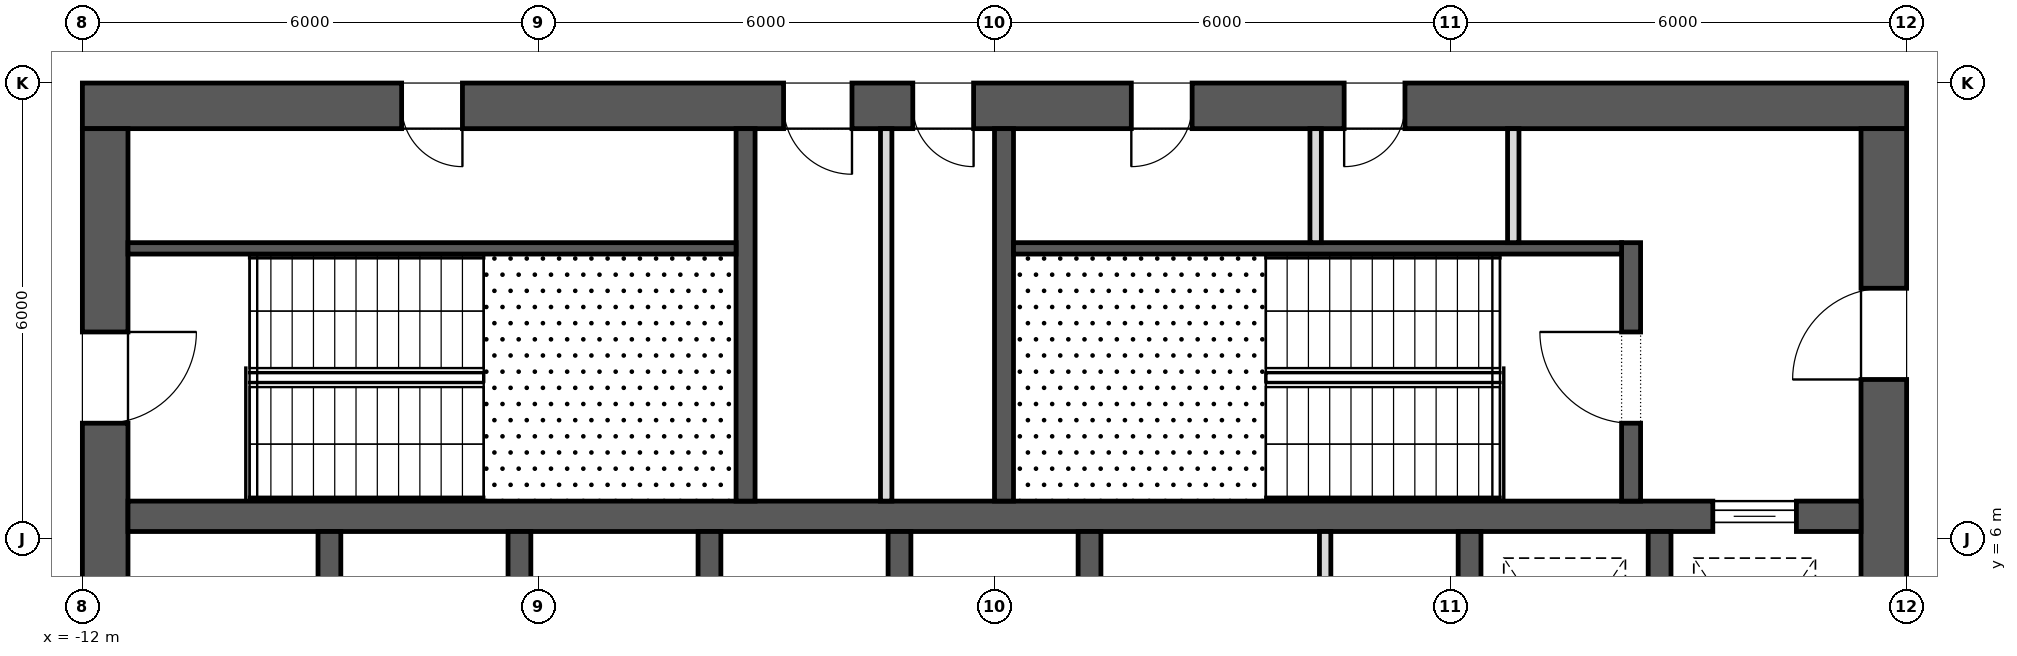
"""IFC4 building model, lengths in metres.
Left out: names, types, materials, properties, quantities, classifications, styles, units other than length and angle.
Written with IfcOpenShell. Run it as: python <this file> out.ifc"""

import sys

from ifc_helpers import new_model, si_unit, direction, frame, frame_2d, origin, place, context, subcontext, project, spatial, rectangle, extrude, element, fill, save


model = new_model("IFC4")
c1 = context("Model", 3, precision=1e-05, world=origin(), true_north=direction((0.0, 1.0)))
c2 = subcontext(c1, "Body", "Model", "MODEL_VIEW")
j1 = project(units=[si_unit("LENGTHUNIT", "METRE"), si_unit("PLANEANGLEUNIT", "RADIAN")], contexts=[c1])
p1 = place(None, origin())
s1 = spatial("IfcSite", under=j1, at=p1, CompositionType="ELEMENT")
p2 = place(p1, origin())
s2 = spatial("IfcBuilding", under=s1, at=p2, CompositionType="ELEMENT")
p3 = place(p2, frame((0.0, 0.0, 210.9)))
s3 = spatial("IfcBuildingStorey", under=s2, at=p3, CompositionType="ELEMENT", Elevation=210.9)
p4 = place(p3, frame((-12.0, 11.7, 0.0), z_axis=(0.0, 0.0, 1.0), x_axis=(1.0, 0.0, 0.0)))
e1 = element("IfcWall", 1, at=p4, inside=s3, PredefinedType="SHEAR", context=c2, shape_type="SweptSolid", body=[
    extrude(rectangle(XDim=24.0, YDim=0.6, at=frame_2d((12.0, 0.0))), origin(), (0.0, 0.0, 1.0), 4.0),
])
p5 = place(p4, frame((9.225, 0.0, 0.0)))
e2 = element("IfcOpeningElement", 2, at=p5, cuts=e1, PredefinedType="OPENING", context=c2, shape_type="SweptSolid", body=[
    extrude(rectangle(XDim=0.9, YDim=2.1, at=frame_2d((0.45, 1.05))), frame((0.0, 0.312, 0.0), z_axis=(0.0, -1.0, 0.0), x_axis=(1.0, 0.0, 0.0)), (0.0, 0.0, 1.0), 0.624),
])
p6 = place(p4, frame((10.925, 0.0, 0.0)))
e3 = element("IfcOpeningElement", 3, at=p6, cuts=e1, PredefinedType="OPENING", context=c2, shape_type="SweptSolid", body=[
    extrude(rectangle(XDim=0.8, YDim=2.1, at=frame_2d((0.4, 1.05))), frame((0.0, 0.312, 0.0), z_axis=(0.0, -1.0, 0.0), x_axis=(1.0, 0.0, 0.0)), (0.0, 0.0, 1.0), 0.624),
])
p7 = place(p4, frame((4.2, 0.0, 0.0)))
e4 = element("IfcOpeningElement", 4, at=p7, cuts=e1, PredefinedType="OPENING", context=c2, shape_type="SweptSolid", body=[
    extrude(rectangle(XDim=0.8, YDim=2.1, at=frame_2d((0.4, 1.05))), frame((0.0, 0.312, 0.0), z_axis=(0.0, -1.0, 0.0), x_axis=(1.0, 0.0, 0.0)), (0.0, 0.0, 1.0), 0.624),
])
p8 = place(p4, frame((13.8, 0.0, 0.0)))
e5 = element("IfcOpeningElement", 5, at=p8, cuts=e1, PredefinedType="OPENING", context=c2, shape_type="SweptSolid", body=[
    extrude(rectangle(XDim=0.8, YDim=2.1, at=frame_2d((0.4, 1.05))), frame((0.0, 0.312, 0.0), z_axis=(0.0, -1.0, 0.0), x_axis=(1.0, 0.0, 0.0)), (0.0, 0.0, 1.0), 0.624),
])
p9 = place(p4, frame((16.6, 0.0, 0.0)))
e6 = element("IfcOpeningElement", 6, at=p9, cuts=e1, PredefinedType="OPENING", context=c2, shape_type="SweptSolid", body=[
    extrude(rectangle(XDim=0.8, YDim=2.1, at=frame_2d((0.4, 1.05))), frame((0.0, 0.312, 0.0), z_axis=(0.0, -1.0, 0.0), x_axis=(1.0, 0.0, 0.0)), (0.0, 0.0, 1.0), 0.624),
])
p10 = place(p3, frame((11.7, -11.4, 0.0), z_axis=(0.0, 0.0, 1.0), x_axis=(0.0, 1.0, 0.0)))
e7 = element("IfcWall", 7, at=p10, inside=s3, PredefinedType="SHEAR", context=c2, shape_type="SweptSolid", body=[
    extrude(rectangle(XDim=22.8, YDim=0.6, at=frame_2d((11.4, 0.0))), origin(), (0.0, 0.0, 1.0), 4.0),
])
p11 = place(p10, frame((10.2, 0.0, 0.0)))
e8 = element("IfcOpeningElement", 8, at=p11, cuts=e7, PredefinedType="OPENING", context=c2, shape_type="SweptSolid", body=[
    extrude(rectangle(XDim=2.4, YDim=2.1, at=frame_2d((1.2, 1.05))), frame((0.0, 0.312, 0.0), z_axis=(0.0, -1.0, 0.0), x_axis=(1.0, 0.0, 0.0)), (0.0, 0.0, 1.0), 0.624),
])
p12 = place(p10, frame((19.5, 0.0, 0.0)))
e9 = element("IfcOpeningElement", 9, at=p12, cuts=e7, PredefinedType="OPENING", context=c2, shape_type="SweptSolid", body=[
    extrude(rectangle(XDim=1.2, YDim=2.1, at=frame_2d((0.6, 1.05))), frame((0.0, 0.312, 0.0), z_axis=(0.0, -1.0, 0.0), x_axis=(1.0, 0.0, 0.0)), (0.0, 0.0, 1.0), 0.624),
])
p13 = place(p10, frame((2.1, 0.0, 0.0)))
e10 = element("IfcOpeningElement", 10, at=p13, cuts=e7, PredefinedType="OPENING", context=c2, shape_type="SweptSolid", body=[
    extrude(rectangle(XDim=1.2, YDim=2.1, at=frame_2d((0.6, 1.05))), frame((0.0, 0.312, 0.0), z_axis=(0.0, -1.0, 0.0), x_axis=(1.0, 0.0, 0.0)), (0.0, 0.0, 1.0), 0.624),
])
p14 = place(p3, frame((-11.7, -11.4, 0.0), z_axis=(0.0, 0.0, 1.0), x_axis=(0.0, 1.0, 0.0)))
e11 = element("IfcWall", 11, at=p14, inside=s3, PredefinedType="SHEAR", context=c2, shape_type="SweptSolid", body=[
    extrude(rectangle(XDim=22.8, YDim=0.6, at=frame_2d((11.4, 0.0))), origin(), (0.0, 0.0, 1.0), 4.0),
])
p15 = place(p14, frame((10.2, 0.0, 0.0)))
e12 = element("IfcOpeningElement", 12, at=p15, cuts=e11, PredefinedType="OPENING", context=c2, shape_type="SweptSolid", body=[
    extrude(rectangle(XDim=2.4, YDim=2.1, at=frame_2d((1.2, 1.05))), frame((0.0, 0.312, 0.0), z_axis=(0.0, -1.0, 0.0), x_axis=(1.0, 0.0, 0.0)), (0.0, 0.0, 1.0), 0.624),
])
p16 = place(p14, frame((18.925, 0.0, 0.0)))
e13 = element("IfcOpeningElement", 13, at=p16, cuts=e11, PredefinedType="OPENING", context=c2, shape_type="SweptSolid", body=[
    extrude(rectangle(XDim=1.2, YDim=2.1, at=frame_2d((0.6, 1.05))), frame((0.0, 0.312, 0.0), z_axis=(0.0, -1.0, 0.0), x_axis=(1.0, 0.0, 0.0)), (0.0, 0.0, 1.0), 0.624),
])
p17 = place(p14, frame((2.675, 0.0, 0.0)))
e14 = element("IfcOpeningElement", 14, at=p17, cuts=e11, PredefinedType="OPENING", context=c2, shape_type="SweptSolid", body=[
    extrude(rectangle(XDim=1.2, YDim=2.1, at=frame_2d((0.6, 1.05))), frame((0.0, 0.312, 0.0), z_axis=(0.0, -1.0, 0.0), x_axis=(1.0, 0.0, 0.0)), (0.0, 0.0, 1.0), 0.624),
])
p18 = place(p3, frame((-11.4, 6.3, 0.0), z_axis=(0.0, 0.0, 1.0), x_axis=(1.0, 0.0, 0.0)))
e15 = element("IfcWall", 15, at=p18, inside=s3, PredefinedType="SHEAR", context=c2, shape_type="SweptSolid", body=[
    extrude(rectangle(XDim=22.8, YDim=0.4, at=frame_2d((11.4, 0.0))), origin(), (0.0, 0.0, 1.0), 4.0),
])
p19 = place(p18, frame((20.85, 0.0, 0.0)))
e16 = element("IfcOpeningElement", 16, at=p19, cuts=e15, PredefinedType="OPENING", context=c2, shape_type="SweptSolid", body=[
    extrude(rectangle(XDim=1.1, YDim=2.1, at=frame_2d((0.55, 1.05))), frame((0.0, 0.212, 0.0), z_axis=(0.0, -1.0, 0.0), x_axis=(1.0, 0.0, 0.0)), (0.0, 0.0, 1.0), 0.424),
])
for number, where, z_axis, x_axis in (
    (17, (-8.75, 3.2, 0.0), (0.0, 0.0, 1.0), (0.0, 1.0, 0.0)),
    (18, (-6.25, 3.2, 0.0), (0.0, 0.0, 1.0), (0.0, 1.0, 0.0)),
    (19, (-3.75, 3.2, 0.0), (0.0, 0.0, 1.0), (0.0, 1.0, 0.0)),
    (20, (-1.25, 3.2, 0.0), (0.0, 0.0, 1.0), (0.0, 1.0, 0.0)),
    (21, (1.25, 3.2, 0.0), (0.0, 0.0, 1.0), (0.0, 1.0, 0.0)),
    (22, (6.25, 3.2, 0.0), (0.0, 0.0, 1.0), (0.0, 1.0, 0.0)),
    (23, (8.75, 3.2, 0.0), (0.0, 0.0, 1.0), (0.0, 1.0, 0.0)),
):
    element("IfcWall", number, at=place(p3, frame(where, z_axis=z_axis, x_axis=x_axis)), inside=s3, PredefinedType="SHEAR", context=c2, shape_type="SweptSolid", body=[
        extrude(rectangle(XDim=2.9, YDim=0.3, at=frame_2d((1.45, 0.0))), origin(), (0.0, 0.0, 1.0), 4.0),
    ])
for number, where, z_axis, x_axis in (
    (24, (-3.275, 6.5, 0.0), (0.0, 0.0, 1.0), (0.0, 1.0, 0.0)),
    (25, (0.125, 6.5, 0.0), (0.0, 0.0, 1.0), (0.0, 1.0, 0.0)),
):
    element("IfcWall", number, at=place(p3, frame(where, z_axis=z_axis, x_axis=x_axis)), inside=s3, PredefinedType="SHEAR", context=c2, shape_type="SweptSolid", body=[
        extrude(rectangle(XDim=4.9, YDim=0.25, at=frame_2d((2.45, 0.0))), origin(), (0.0, 0.0, 1.0), 3.7),
    ])
p20 = place(p3, frame((8.375, 6.5, 0.0), z_axis=(0.0, 0.0, 1.0), x_axis=(0.0, 1.0, 0.0)))
e26 = element("IfcWall", 26, at=p20, inside=s3, PredefinedType="SHEAR", context=c2, shape_type="SweptSolid", body=[
    extrude(rectangle(XDim=3.4, YDim=0.25, at=frame_2d((1.7, 0.0))), origin(), (0.0, 0.0, 1.0), 3.7),
])
p21 = place(p20, frame((1.025, 0.0, 0.0)))
e27 = element("IfcOpeningElement", 27, at=p21, cuts=e26, PredefinedType="OPENING", context=c2, shape_type="SweptSolid", body=[
    extrude(rectangle(XDim=1.2, YDim=2.1, at=frame_2d((0.6, 1.05))), frame((0.0, 0.137, 0.0), z_axis=(0.0, -1.0, 0.0), x_axis=(1.0, 0.0, 0.0)), (0.0, 0.0, 1.0), 0.274),
])
for number, where, z_axis, x_axis in (
    (28, (-11.4, 9.825, 0.0), (0.0, 0.0, 1.0), (1.0, 0.0, 0.0)),
    (29, (0.25, 9.825, 0.0), (0.0, 0.0, 1.0), (1.0, 0.0, 0.0)),
):
    element("IfcWall", number, at=place(p3, frame(where, z_axis=z_axis, x_axis=x_axis)), inside=s3, PredefinedType="SHEAR", context=c2, shape_type="SweptSolid", body=[
        extrude(rectangle(XDim=8.0, YDim=0.15, at=frame_2d((4.0, 0.0))), origin(), (0.0, 0.0, 1.0), 3.7),
    ])
p22 = place(p3, frame((-1.425, 6.5, 0.0), z_axis=(0.0, 0.0, 1.0), x_axis=(0.0, 1.0, 0.0)))
e30 = element("IfcWall", 30, at=p22, inside=s3, PredefinedType="PARTITIONING", context=c2, shape_type="SweptSolid", body=[
    extrude(rectangle(XDim=4.9, YDim=0.15, at=frame_2d((2.45, 0.0))), origin(), (0.0, 0.0, 1.0), 3.7),
])
for number, where, z_axis, x_axis in (
    (31, (4.225, 9.9, 0.0), (0.0, 0.0, 1.0), (0.0, 1.0, 0.0)),
    (32, (6.825, 9.9, 0.0), (0.0, 0.0, 1.0), (0.0, 1.0, 0.0)),
):
    element("IfcWall", number, at=place(p3, frame(where, z_axis=z_axis, x_axis=x_axis)), inside=s3, PredefinedType="PARTITIONING", context=c2, shape_type="SweptSolid", body=[
        extrude(rectangle(XDim=1.5, YDim=0.15, at=frame_2d((0.75, 0.0))), origin(), (0.0, 0.0, 1.0), 3.7),
    ])
p23 = place(p3, frame((4.35, 3.2, 0.0), z_axis=(0.0, 0.0, 1.0), x_axis=(0.0, 1.0, 0.0)))
e33 = element("IfcWall", 33, at=p23, inside=s3, PredefinedType="PARTITIONING", context=c2, shape_type="SweptSolid", body=[
    extrude(rectangle(XDim=2.9, YDim=0.15, at=frame_2d((1.45, 0.0))), origin(), (0.0, 0.0, 1.0), 3.7),
])
p24 = place(p19, origin())
e34 = element("IfcDoor", 34, at=p24, inside=s3, OperationType="SLIDING_TO_LEFT", PredefinedType="DOOR", context=c2, shape_type="SweptSolid", body=[
    extrude(rectangle(XDim=1.1, YDim=2.1, at=frame_2d((0.55, 1.05))), frame((0.0, 0.025, 0.0), z_axis=(0.0, -1.0, 0.0), x_axis=(1.0, 0.0, 0.0)), (0.0, 0.0, 1.0), 0.05),
])
fill(e16, e34)
p25 = place(p16, frame((1.2, 0.0, 0.0), z_axis=(0.0, 0.0, 1.0), x_axis=(-1.0, 0.0, 0.0)))
e35 = element("IfcDoor", 35, at=p25, inside=s3, OperationType="SINGLE_SWING_RIGHT", PredefinedType="DOOR", context=c2, shape_type="SweptSolid", body=[
    extrude(rectangle(XDim=1.2, YDim=2.1, at=frame_2d((0.6, 1.05))), frame((0.0, 0.025, 0.0), z_axis=(0.0, -1.0, 0.0), x_axis=(1.0, 0.0, 0.0)), (0.0, 0.0, 1.0), 0.05),
])
fill(e13, e35)
p26 = place(p21, origin())
e36 = element("IfcDoor", 36, at=p26, inside=s3, OperationType="SINGLE_SWING_LEFT", PredefinedType="DOOR", context=c2, shape_type="SweptSolid", body=[
    extrude(rectangle(XDim=1.2, YDim=2.1, at=frame_2d((0.6, 1.05))), frame((0.0, 0.025, 0.0), z_axis=(0.0, -1.0, 0.0), x_axis=(1.0, 0.0, 0.0)), (0.0, 0.0, 1.0), 0.05),
])
fill(e27, e36)
p27 = place(p12, origin())
e37 = element("IfcDoor", 37, at=p27, inside=s3, OperationType="SINGLE_SWING_RIGHT", PredefinedType="DOOR", context=c2, shape_type="SweptSolid", body=[
    extrude(rectangle(XDim=1.2, YDim=2.1, at=frame_2d((0.6, 1.05))), frame((0.0, 0.025, 0.0), z_axis=(0.0, -1.0, 0.0), x_axis=(1.0, 0.0, 0.0)), (0.0, 0.0, 1.0), 0.05),
])
fill(e9, e37)
p28 = place(p5, frame((0.9, 0.0, 0.0), z_axis=(0.0, 0.0, 1.0), x_axis=(-1.0, 0.0, 0.0)))
e38 = element("IfcDoor", 38, at=p28, inside=s3, OperationType="SINGLE_SWING_RIGHT", PredefinedType="DOOR", context=c2, shape_type="SweptSolid", body=[
    extrude(rectangle(XDim=0.9, YDim=2.1, at=frame_2d((0.45, 1.05))), frame((0.0, 0.025, 0.0), z_axis=(0.0, -1.0, 0.0), x_axis=(1.0, 0.0, 0.0)), (0.0, 0.0, 1.0), 0.05),
])
fill(e2, e38)
p29 = place(p6, frame((0.8, 0.0, 0.0), z_axis=(0.0, 0.0, 1.0), x_axis=(-1.0, 0.0, 0.0)))
e39 = element("IfcDoor", 39, at=p29, inside=s3, OperationType="SINGLE_SWING_RIGHT", PredefinedType="DOOR", context=c2, shape_type="SweptSolid", body=[
    extrude(rectangle(XDim=0.8, YDim=2.1, at=frame_2d((0.4, 1.05))), frame((0.0, 0.025, 0.0), z_axis=(0.0, -1.0, 0.0), x_axis=(1.0, 0.0, 0.0)), (0.0, 0.0, 1.0), 0.05),
])
fill(e3, e39)
p30 = place(p7, frame((0.8, 0.0, 0.0), z_axis=(0.0, 0.0, 1.0), x_axis=(-1.0, 0.0, 0.0)))
e40 = element("IfcDoor", 40, at=p30, inside=s3, OperationType="SINGLE_SWING_RIGHT", PredefinedType="DOOR", context=c2, shape_type="SweptSolid", body=[
    extrude(rectangle(XDim=0.8, YDim=2.1, at=frame_2d((0.4, 1.05))), frame((0.0, 0.025, 0.0), z_axis=(0.0, -1.0, 0.0), x_axis=(1.0, 0.0, 0.0)), (0.0, 0.0, 1.0), 0.05),
])
fill(e4, e40)
p31 = place(p8, frame((0.8, 0.0, 0.0), z_axis=(0.0, 0.0, 1.0), x_axis=(-1.0, 0.0, 0.0)))
e41 = element("IfcDoor", 41, at=p31, inside=s3, OperationType="SINGLE_SWING_LEFT", PredefinedType="DOOR", context=c2, shape_type="SweptSolid", body=[
    extrude(rectangle(XDim=0.8, YDim=2.1, at=frame_2d((0.4, 1.05))), frame((0.0, 0.025, 0.0), z_axis=(0.0, -1.0, 0.0), x_axis=(1.0, 0.0, 0.0)), (0.0, 0.0, 1.0), 0.05),
])
fill(e5, e41)
p32 = place(p9, frame((0.8, 0.0, 0.0), z_axis=(0.0, 0.0, 1.0), x_axis=(-1.0, 0.0, 0.0)))
e42 = element("IfcDoor", 42, at=p32, inside=s3, OperationType="SINGLE_SWING_LEFT", PredefinedType="DOOR", context=c2, shape_type="SweptSolid", body=[
    extrude(rectangle(XDim=0.8, YDim=2.1, at=frame_2d((0.4, 1.05))), frame((0.0, 0.025, 0.0), z_axis=(0.0, -1.0, 0.0), x_axis=(1.0, 0.0, 0.0)), (0.0, 0.0, 1.0), 0.05),
])
fill(e6, e42)
save(model, sys.argv[1])
